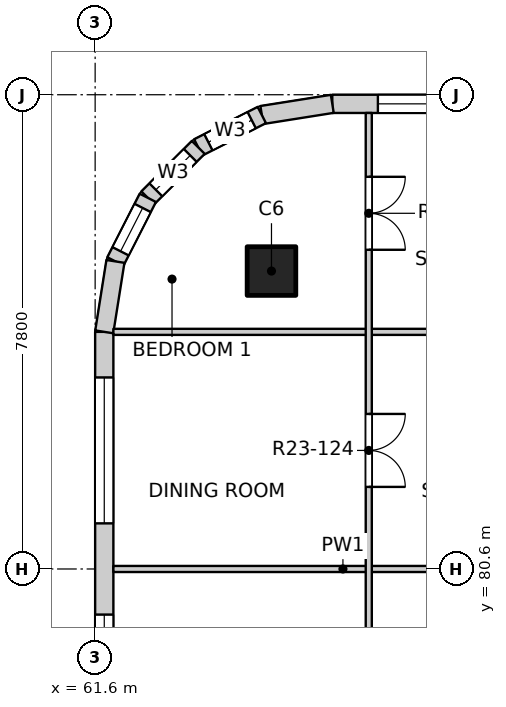
"""IFC4 building model, lengths in metres.
Left out: names, types, materials, properties, quantities, classifications, styles, units other than length and angle.
Written with IfcOpenShell. Run it as: python <this file> out.ifc"""

import sys

from ifc_helpers import new_model, si_unit, direction, frame, frame_2d, origin, origin_2d, place, context, subcontext, project, spatial, rectangle, extrude, element, fill, save


model = new_model("IFC4")
c1 = context("Model", 3, precision=1e-05, world=origin(), true_north=direction((0.0, 1.0)))
c2 = subcontext(c1, "Body", "Model", "MODEL_VIEW")
j1 = project(units=[si_unit("LENGTHUNIT", "METRE"), si_unit("PLANEANGLEUNIT", "RADIAN")], contexts=[c1])
p1 = place(None, origin())
s1 = spatial("IfcSite", under=j1, at=p1, CompositionType="ELEMENT")
p2 = place(p1, origin())
s2 = spatial("IfcBuilding", under=s1, at=p2, CompositionType="ELEMENT")
p3 = place(p2, frame((0.0, 0.0, 234.7)))
s3 = spatial("IfcBuildingStorey", under=s2, at=p3, CompositionType="ELEMENT", Elevation=234.7)
p4 = place(p3, frame((64.5, 85.5, -0.25), z_axis=(0.0, 0.0, 1.0), x_axis=(1.0, 0.0, 0.0)))
e1 = element("IfcColumn", 1, at=p4, inside=s3, PredefinedType="COLUMN", context=c2, shape_type="SweptSolid", body=[
    extrude(rectangle(XDim=0.8, YDim=0.8, at=origin_2d()), origin(), (0.0, 0.0, 1.0), 3.4),
])
p5 = place(p3, frame((65.5, 88.25, 0.0), z_axis=(0.0, 0.0, 1.0), x_axis=(1.0, 0.0, 0.0)))
e2 = element("IfcWall", 2, at=p5, inside=s3, PredefinedType="SOLIDWALL", context=c2, shape_type="SweptSolid", body=[
    extrude(rectangle(XDim=7.4, YDim=0.3, at=frame_2d((3.7, 0.0))), origin(), (0.0, 0.0, 1.0), 2.7),
])
p6 = place(p5, frame((0.75, 0.0, 0.9)))
e3 = element("IfcOpeningElement", 3, at=p6, cuts=e2, PredefinedType="OPENING", context=c2, shape_type="SweptSolid", body=[
    extrude(rectangle(XDim=2.4, YDim=1.8, at=frame_2d((1.2, 0.9))), frame((0.0, 0.16, 0.0), z_axis=(0.0, -1.0, 0.0), x_axis=(1.0, 0.0, 0.0)), (0.0, 0.0, 1.0), 0.32),
])
p7 = place(p5, frame((4.65, 0.0, 0.9)))
e4 = element("IfcOpeningElement", 4, at=p7, cuts=e2, PredefinedType="OPENING", context=c2, shape_type="SweptSolid", body=[
    extrude(rectangle(XDim=2.4, YDim=1.8, at=frame_2d((1.2, 0.9))), frame((0.0, 0.16, 0.0), z_axis=(0.0, -1.0, 0.0), x_axis=(1.0, 0.0, 0.0)), (0.0, 0.0, 1.0), 0.32),
])
p8 = place(p3, frame((61.75, 77.1, 0.0), z_axis=(0.0, 0.0, 1.0), x_axis=(0.0, 1.0, 0.0)))
e5 = element("IfcWall", 5, at=p8, inside=s3, PredefinedType="SOLIDWALL", context=c2, shape_type="SweptSolid", body=[
    extrude(rectangle(XDim=7.4, YDim=0.3, at=frame_2d((3.7, 0.0))), origin(), (0.0, 0.0, 1.0), 2.7),
])
p9 = place(p8, frame((0.35, 0.0, 0.9)))
e6 = element("IfcOpeningElement", 6, at=p9, cuts=e5, PredefinedType="OPENING", context=c2, shape_type="SweptSolid", body=[
    extrude(rectangle(XDim=2.4, YDim=1.8, at=frame_2d((1.2, 0.9))), frame((0.0, 0.16, 0.0), z_axis=(0.0, -1.0, 0.0), x_axis=(1.0, 0.0, 0.0)), (0.0, 0.0, 1.0), 0.32),
])
p10 = place(p8, frame((4.25, 0.0, 0.9)))
e7 = element("IfcOpeningElement", 7, at=p10, cuts=e5, PredefinedType="OPENING", context=c2, shape_type="SweptSolid", body=[
    extrude(rectangle(XDim=2.4, YDim=1.8, at=frame_2d((1.2, 0.9))), frame((0.0, 0.16, 0.0), z_axis=(0.0, -1.0, 0.0), x_axis=(1.0, 0.0, 0.0)), (0.0, 0.0, 1.0), 0.32),
])
p11 = place(p3, frame((65.5, 88.25, 0.0), z_axis=(0.0, 0.0, 1.0), x_axis=(-0.987678452879, -0.156496880861, 0.0)))
e8 = element("IfcWall", 8, at=p11, inside=s3, PredefinedType="SOLIDWALL", context=c2, shape_type="SweptSolid", body=[
    extrude(rectangle(XDim=1.173, YDim=0.3, at=frame_2d((0.586, 0.0))), origin(), (0.0, 0.0, 1.0), 2.7),
])
p12 = place(p3, frame((64.341, 88.066, 0.0), z_axis=(0.0, 0.0, 1.0), x_axis=(-0.890988677504, -0.454025524128, 0.0)))
e9 = element("IfcWall", 9, at=p12, inside=s3, PredefinedType="SOLIDWALL", context=c2, shape_type="SweptSolid", body=[
    extrude(rectangle(XDim=1.173, YDim=0.3, at=frame_2d((0.587, 0.0))), origin(), (0.0, 0.0, 1.0), 2.7),
])
p13 = place(p12, frame((0.187, 0.0, 0.9)))
e10 = element("IfcOpeningElement", 10, at=p13, cuts=e9, PredefinedType="OPENING", context=c2, shape_type="SweptSolid", body=[
    extrude(rectangle(XDim=0.8, YDim=1.2, at=frame_2d((0.4, 0.6))), frame((0.0, 0.16, 0.0), z_axis=(0.0, -1.0, 0.0), x_axis=(1.0, 0.0, 0.0)), (0.0, 0.0, 1.0), 0.32),
])
p14 = place(p3, frame((63.296, 87.534, 0.0), z_axis=(0.0, 0.0, 1.0), x_axis=(-0.707106781187, -0.707106781187, 0.0)))
e11 = element("IfcWall", 11, at=p14, inside=s3, PredefinedType="SOLIDWALL", context=c2, shape_type="SweptSolid", body=[
    extrude(rectangle(XDim=1.173, YDim=0.3, at=frame_2d((0.586, 0.0))), origin(), (0.0, 0.0, 1.0), 2.7),
])
p15 = place(p14, frame((0.187, 0.0, 0.9)))
e12 = element("IfcOpeningElement", 12, at=p15, cuts=e11, PredefinedType="OPENING", context=c2, shape_type="SweptSolid", body=[
    extrude(rectangle(XDim=0.8, YDim=1.2, at=frame_2d((0.4, 0.6))), frame((0.0, 0.16, 0.0), z_axis=(0.0, -1.0, 0.0), x_axis=(1.0, 0.0, 0.0)), (0.0, 0.0, 1.0), 0.32),
])
p16 = place(p3, frame((62.466, 86.704, 0.0), z_axis=(0.0, 0.0, 1.0), x_axis=(-0.454025524128, -0.890988677504, 0.0)))
e13 = element("IfcWall", 13, at=p16, inside=s3, PredefinedType="SOLIDWALL", context=c2, shape_type="SweptSolid", body=[
    extrude(rectangle(XDim=1.173, YDim=0.3, at=frame_2d((0.587, 0.0))), origin(), (0.0, 0.0, 1.0), 2.7),
])
p17 = place(p16, frame((0.187, 0.0, 0.9)))
e14 = element("IfcOpeningElement", 14, at=p17, cuts=e13, PredefinedType="OPENING", context=c2, shape_type="SweptSolid", body=[
    extrude(rectangle(XDim=0.8, YDim=1.2, at=frame_2d((0.4, 0.6))), frame((0.0, 0.16, 0.0), z_axis=(0.0, -1.0, 0.0), x_axis=(1.0, 0.0, 0.0)), (0.0, 0.0, 1.0), 0.32),
])
p18 = place(p3, frame((61.934, 85.659, 0.0), z_axis=(0.0, 0.0, 1.0), x_axis=(-0.156496880861, -0.987678452879, 0.0)))
e15 = element("IfcWall", 15, at=p18, inside=s3, PredefinedType="SOLIDWALL", context=c2, shape_type="SweptSolid", body=[
    extrude(rectangle(XDim=1.173, YDim=0.3, at=frame_2d((0.586, 0.0))), origin(), (0.0, 0.0, 1.0), 2.7),
])
p19 = place(p3, frame((61.9, 80.6, 0.0), z_axis=(0.0, 0.0, 1.0), x_axis=(1.0, 0.0, 0.0)))
e16 = element("IfcWall", 16, at=p19, inside=s3, PredefinedType="PARTITIONING", context=c2, shape_type="SweptSolid", body=[
    extrude(rectangle(XDim=7.55, YDim=0.1, at=frame_2d((3.775, 0.0))), origin(), (0.0, 0.0, 1.0), 3.15),
])
p20 = place(p3, frame((61.9, 84.5, 0.0), z_axis=(0.0, 0.0, 1.0), x_axis=(1.0, 0.0, 0.0)))
e17 = element("IfcWall", 17, at=p20, inside=s3, PredefinedType="PARTITIONING", context=c2, shape_type="SweptSolid", body=[
    extrude(rectangle(XDim=11.5, YDim=0.1, at=frame_2d((5.75, 0.0))), origin(), (0.0, 0.0, 1.0), 3.15),
])
p21 = place(p20, frame((7.965, 0.0, 0.0)))
e18 = element("IfcOpeningElement", 18, at=p21, cuts=e17, PredefinedType="OPENING", context=c2, shape_type="SweptSolid", body=[
    extrude(rectangle(XDim=0.9, YDim=2.1, at=frame_2d((0.45, 1.05))), frame((0.0, 0.06, 0.0), z_axis=(0.0, -1.0, 0.0), x_axis=(1.0, 0.0, 0.0)), (0.0, 0.0, 1.0), 0.12),
])
p22 = place(p3, frame((66.1, 76.8, 0.0), z_axis=(0.0, 0.0, 1.0), x_axis=(0.0, 1.0, 0.0)))
e19 = element("IfcWall", 19, at=p22, inside=s3, PredefinedType="PARTITIONING", context=c2, shape_type="SweptSolid", body=[
    extrude(rectangle(XDim=11.3, YDim=0.1, at=frame_2d((5.65, 0.0))), origin(), (0.0, 0.0, 1.0), 3.15),
])
p23 = place(p22, frame((1.25, 0.0, 0.0)))
e20 = element("IfcOpeningElement", 20, at=p23, cuts=e19, PredefinedType="OPENING", context=c2, shape_type="SweptSolid", body=[
    extrude(rectangle(XDim=1.2, YDim=2.1, at=frame_2d((0.6, 1.05))), frame((0.0, 0.06, 0.0), z_axis=(0.0, -1.0, 0.0), x_axis=(1.0, 0.0, 0.0)), (0.0, 0.0, 1.0), 0.12),
])
p24 = place(p22, frame((5.15, 0.0, 0.0)))
e21 = element("IfcOpeningElement", 21, at=p24, cuts=e19, PredefinedType="OPENING", context=c2, shape_type="SweptSolid", body=[
    extrude(rectangle(XDim=1.2, YDim=2.1, at=frame_2d((0.6, 1.05))), frame((0.0, 0.06, 0.0), z_axis=(0.0, -1.0, 0.0), x_axis=(1.0, 0.0, 0.0)), (0.0, 0.0, 1.0), 0.12),
])
p25 = place(p22, frame((9.05, 0.0, 0.0)))
e22 = element("IfcOpeningElement", 22, at=p25, cuts=e19, PredefinedType="OPENING", context=c2, shape_type="SweptSolid", body=[
    extrude(rectangle(XDim=1.2, YDim=2.1, at=frame_2d((0.6, 1.05))), frame((0.0, 0.06, 0.0), z_axis=(0.0, -1.0, 0.0), x_axis=(1.0, 0.0, 0.0)), (0.0, 0.0, 1.0), 0.12),
])
p26 = place(p6, origin())
e23 = element("IfcWindow", 23, at=p26, inside=s3, PartitioningType="DOUBLE_PANEL_VERTICAL", PredefinedType="WINDOW", context=c2, shape_type="SweptSolid", body=[
    extrude(rectangle(XDim=2.4, YDim=1.8, at=frame_2d((1.2, 0.9))), frame((0.0, 0.03, 0.0), z_axis=(0.0, -1.0, 0.0), x_axis=(1.0, 0.0, 0.0)), (0.0, 0.0, 1.0), 0.06),
])
fill(e3, e23)
p27 = place(p9, origin())
e24 = element("IfcWindow", 24, at=p27, inside=s3, PartitioningType="DOUBLE_PANEL_VERTICAL", PredefinedType="WINDOW", context=c2, shape_type="SweptSolid", body=[
    extrude(rectangle(XDim=2.4, YDim=1.8, at=frame_2d((1.2, 0.9))), frame((0.0, 0.03, 0.0), z_axis=(0.0, -1.0, 0.0), x_axis=(1.0, 0.0, 0.0)), (0.0, 0.0, 1.0), 0.06),
])
fill(e6, e24)
p28 = place(p10, origin())
e25 = element("IfcWindow", 25, at=p28, inside=s3, PartitioningType="DOUBLE_PANEL_VERTICAL", PredefinedType="WINDOW", context=c2, shape_type="SweptSolid", body=[
    extrude(rectangle(XDim=2.4, YDim=1.8, at=frame_2d((1.2, 0.9))), frame((0.0, 0.03, 0.0), z_axis=(0.0, -1.0, 0.0), x_axis=(1.0, 0.0, 0.0)), (0.0, 0.0, 1.0), 0.06),
])
fill(e7, e25)
p29 = place(p13, origin())
e26 = element("IfcWindow", 26, at=p29, inside=s3, PartitioningType="SINGLE_PANEL", PredefinedType="WINDOW", context=c2, shape_type="SweptSolid", body=[
    extrude(rectangle(XDim=0.8, YDim=1.2, at=frame_2d((0.4, 0.6))), frame((0.0, 0.03, 0.0), z_axis=(0.0, -1.0, 0.0), x_axis=(1.0, 0.0, 0.0)), (0.0, 0.0, 1.0), 0.06),
])
fill(e10, e26)
p30 = place(p15, origin())
e27 = element("IfcWindow", 27, at=p30, inside=s3, PartitioningType="SINGLE_PANEL", PredefinedType="WINDOW", context=c2, shape_type="SweptSolid", body=[
    extrude(rectangle(XDim=0.8, YDim=1.2, at=frame_2d((0.4, 0.6))), frame((0.0, 0.03, 0.0), z_axis=(0.0, -1.0, 0.0), x_axis=(1.0, 0.0, 0.0)), (0.0, 0.0, 1.0), 0.06),
])
fill(e12, e27)
p31 = place(p17, origin())
e28 = element("IfcWindow", 28, at=p31, inside=s3, PartitioningType="SINGLE_PANEL", PredefinedType="WINDOW", context=c2, shape_type="SweptSolid", body=[
    extrude(rectangle(XDim=0.8, YDim=1.2, at=frame_2d((0.4, 0.6))), frame((0.0, 0.03, 0.0), z_axis=(0.0, -1.0, 0.0), x_axis=(1.0, 0.0, 0.0)), (0.0, 0.0, 1.0), 0.06),
])
fill(e14, e28)
p32 = place(p24, origin())
e29 = element("IfcDoor", 29, at=p32, inside=s3, OperationType="DOUBLE_DOOR_SINGLE_SWING", PredefinedType="DOOR", context=c2, shape_type="SweptSolid", body=[
    extrude(rectangle(XDim=1.2, YDim=2.1, at=frame_2d((0.6, 1.05))), frame((0.0, 0.025, 0.0), z_axis=(0.0, -1.0, 0.0), x_axis=(1.0, 0.0, 0.0)), (0.0, 0.0, 1.0), 0.05),
])
fill(e21, e29)
p33 = place(p25, origin())
e30 = element("IfcDoor", 30, at=p33, inside=s3, OperationType="DOUBLE_DOOR_SINGLE_SWING", PredefinedType="DOOR", context=c2, shape_type="SweptSolid", body=[
    extrude(rectangle(XDim=1.2, YDim=2.1, at=frame_2d((0.6, 1.05))), frame((0.0, 0.025, 0.0), z_axis=(0.0, -1.0, 0.0), x_axis=(1.0, 0.0, 0.0)), (0.0, 0.0, 1.0), 0.05),
])
fill(e22, e30)
save(model, sys.argv[1])
